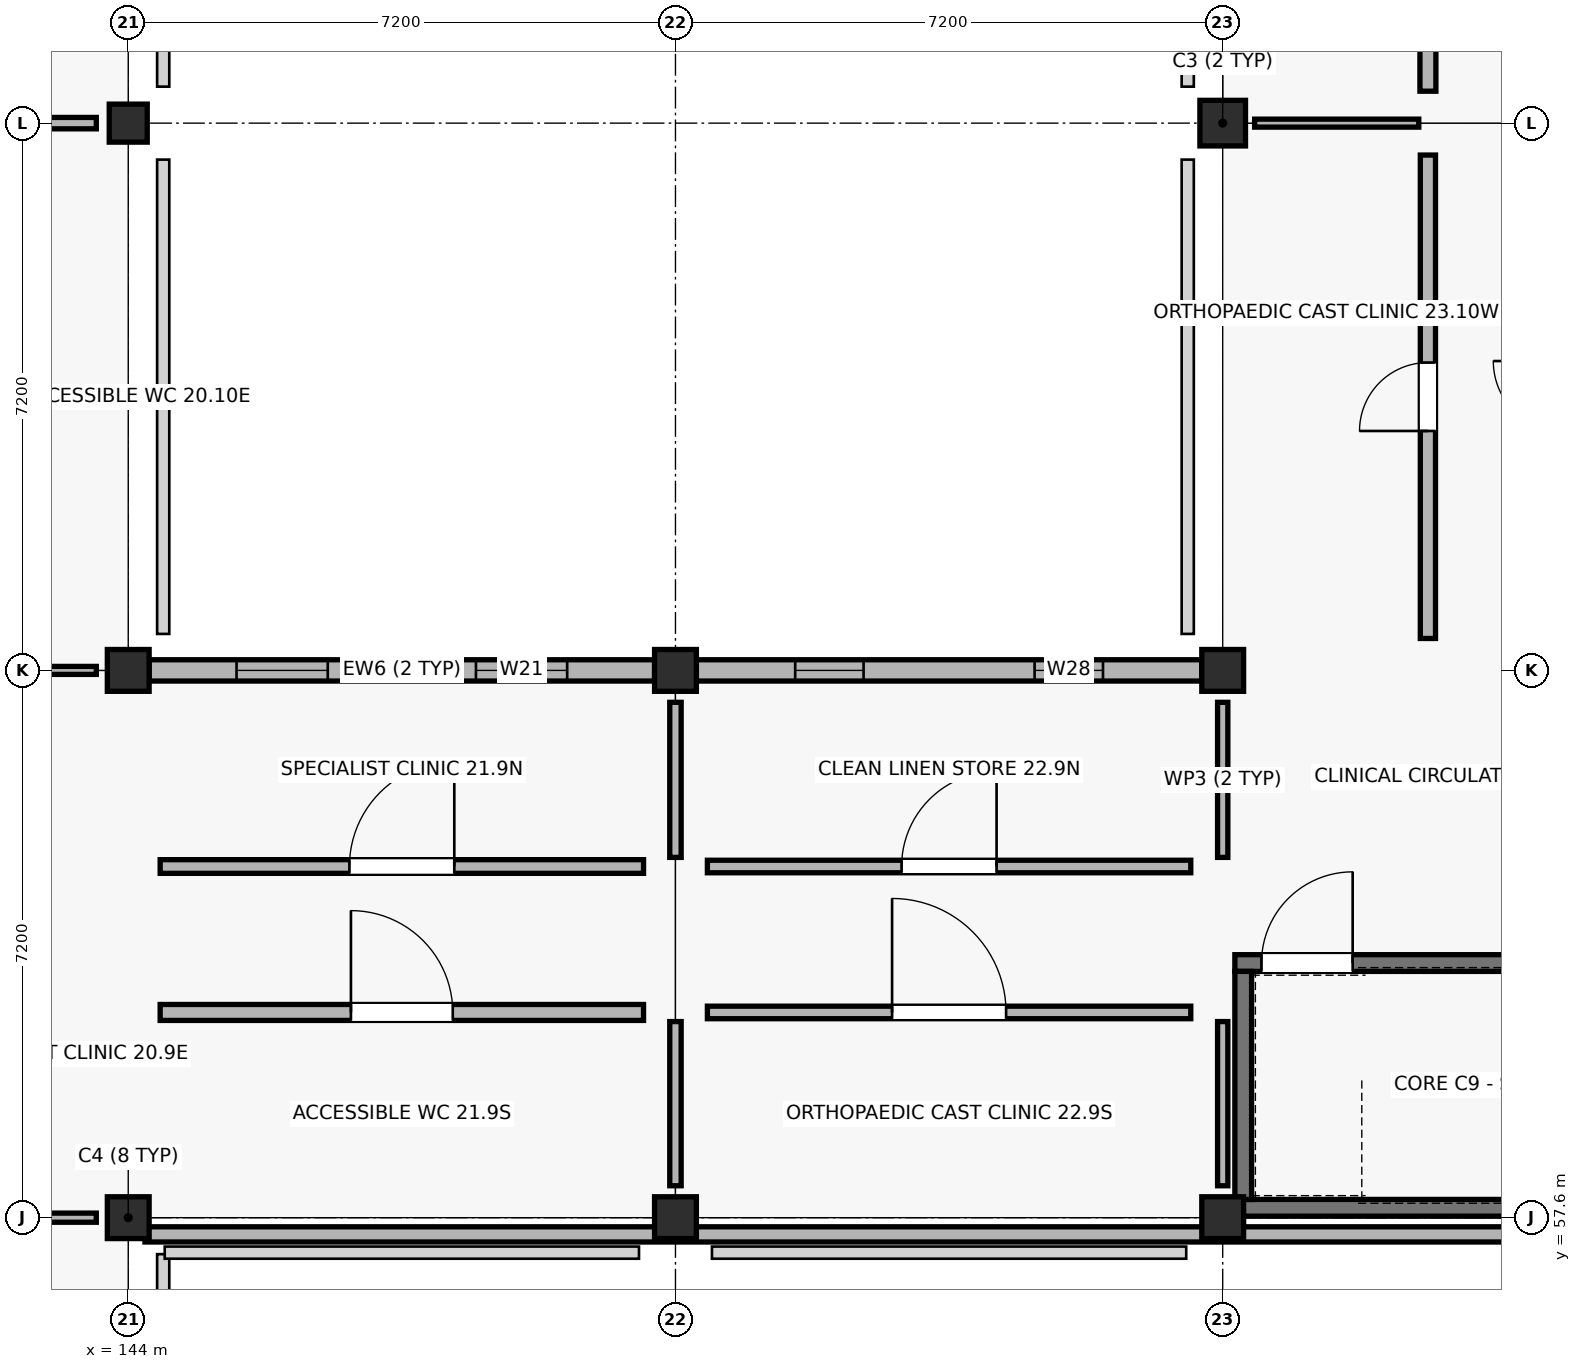
"""IFC4 building model, lengths in metres.
Left out: names, types, materials, properties, quantities, classifications, styles, units other than length and angle.
Written with IfcOpenShell. Run it as: python <this file> out.ifc"""

import sys

from ifc_helpers import new_model, si_unit, direction, frame, frame_2d, origin, origin_2d, place, context, subcontext, project, spatial, rectangle, extrude, element, fill, save


model = new_model("IFC4")
c1 = context("Model", 3, precision=1e-05, world=origin(), true_north=direction((0.0, 1.0)))
c2 = subcontext(c1, "Body", "Model", "MODEL_VIEW")
j1 = project(units=[si_unit("LENGTHUNIT", "METRE"), si_unit("PLANEANGLEUNIT", "RADIAN")], contexts=[c1])
p1 = place(None, origin())
s1 = spatial("IfcSite", under=j1, at=p1, CompositionType="ELEMENT")
p2 = place(p1, origin())
s2 = spatial("IfcBuilding", under=s1, at=p2, CompositionType="ELEMENT")
p3 = place(p2, frame((0.0, 0.0, 9.0)))
s3 = spatial("IfcBuildingStorey", under=s2, at=p3, CompositionType="ELEMENT", Elevation=9.0)
for number, where, z_axis, x_axis in (
    (1, (144.0, 57.6, 0.0), (0.0, 0.0, 1.0), (1.0, 0.0, 0.0)),
    (2, (144.0, 64.8, 0.0), (0.0, 0.0, 1.0), (1.0, 0.0, 0.0)),
):
    element("IfcColumn", number, at=place(p3, frame(where, z_axis=z_axis, x_axis=x_axis)), inside=s3, PredefinedType="COLUMN", context=c2, shape_type="SweptSolid", body=[
        extrude(rectangle(XDim=0.55, YDim=0.55, at=origin_2d()), origin(), (0.0, 0.0, 1.0), 4.5),
    ])
p4 = place(p3, frame((144.0, 72.0, 0.0), z_axis=(0.0, 0.0, 1.0), x_axis=(1.0, 0.0, 0.0)))
e3 = element("IfcColumn", 3, at=p4, inside=s3, PredefinedType="COLUMN", context=c2, shape_type="SweptSolid", body=[
    extrude(rectangle(XDim=0.5, YDim=0.5, at=origin_2d()), origin(), (0.0, 0.0, 1.0), 4.28),
])
for number, where, z_axis, x_axis in (
    (4, (151.2, 57.6, 0.0), (0.0, 0.0, 1.0), (1.0, 0.0, 0.0)),
    (5, (151.2, 64.8, 0.0), (0.0, 0.0, 1.0), (1.0, 0.0, 0.0)),
    (6, (158.4, 57.6, 0.0), (0.0, 0.0, 1.0), (1.0, 0.0, 0.0)),
    (7, (158.4, 64.8, 0.0), (0.0, 0.0, 1.0), (1.0, 0.0, 0.0)),
):
    element("IfcColumn", number, at=place(p3, frame(where, z_axis=z_axis, x_axis=x_axis)), inside=s3, PredefinedType="COLUMN", context=c2, shape_type="SweptSolid", body=[
        extrude(rectangle(XDim=0.55, YDim=0.55, at=origin_2d()), origin(), (0.0, 0.0, 1.0), 4.5),
    ])
p5 = place(p3, frame((158.4, 72.0, 0.0), z_axis=(0.0, 0.0, 1.0), x_axis=(1.0, 0.0, 0.0)))
e8 = element("IfcColumn", 8, at=p5, inside=s3, PredefinedType="COLUMN", context=c2, shape_type="SweptSolid", body=[
    extrude(rectangle(XDim=0.6, YDim=0.6, at=origin_2d()), origin(), (0.0, 0.0, 1.0), 4.5),
])
p6 = place(p3, frame((150.925, 64.8, 0.0), z_axis=(0.0, 0.0, 1.0), x_axis=(-1.0, 0.0, 0.0)))
e9 = element("IfcWall", 9, at=p6, inside=s3, PredefinedType="STANDARD", context=c2, shape_type="SweptSolid", body=[
    extrude(rectangle(XDim=6.65, YDim=0.28, at=frame_2d((3.325, 0.0))), origin(), (0.0, 0.0, 1.0), 3.59),
])
p7 = place(p6, frame((1.15, 0.0, 0.9)))
e10 = element("IfcOpeningElement", 10, at=p7, cuts=e9, PredefinedType="OPENING", context=c2, shape_type="SweptSolid", body=[
    extrude(rectangle(XDim=1.2, YDim=1.5, at=frame_2d((0.6, 0.75))), frame((0.0, 0.15, 0.0), z_axis=(0.0, -1.0, 0.0), x_axis=(1.0, 0.0, 0.0)), (0.0, 0.0, 1.0), 0.3),
])
p8 = place(p6, frame((4.3, 0.0, 0.9)))
e11 = element("IfcOpeningElement", 11, at=p8, cuts=e9, PredefinedType="OPENING", context=c2, shape_type="SweptSolid", body=[
    extrude(rectangle(XDim=1.2, YDim=1.5, at=frame_2d((0.6, 0.75))), frame((0.0, 0.15, 0.0), z_axis=(0.0, -1.0, 0.0), x_axis=(1.0, 0.0, 0.0)), (0.0, 0.0, 1.0), 0.3),
])
p9 = place(p3, frame((158.125, 64.8, 0.0), z_axis=(0.0, 0.0, 1.0), x_axis=(-1.0, 0.0, 0.0)))
e12 = element("IfcWall", 12, at=p9, inside=s3, PredefinedType="STANDARD", context=c2, shape_type="SweptSolid", body=[
    extrude(rectangle(XDim=6.65, YDim=0.28, at=frame_2d((3.325, 0.0))), origin(), (0.0, 0.0, 1.0), 3.59),
])
p10 = place(p9, frame((1.3, 0.0, 0.9)))
e13 = element("IfcOpeningElement", 13, at=p10, cuts=e12, PredefinedType="OPENING", context=c2, shape_type="SweptSolid", body=[
    extrude(rectangle(XDim=0.9, YDim=1.62, at=frame_2d((0.45, 0.81))), frame((0.0, 0.15, 0.0), z_axis=(0.0, -1.0, 0.0), x_axis=(1.0, 0.0, 0.0)), (0.0, 0.0, 1.0), 0.3),
])
p11 = place(p9, frame((4.45, 0.0, 0.9)))
e14 = element("IfcOpeningElement", 14, at=p11, cuts=e12, PredefinedType="OPENING", context=c2, shape_type="SweptSolid", body=[
    extrude(rectangle(XDim=0.9, YDim=1.62, at=frame_2d((0.45, 0.81))), frame((0.0, 0.15, 0.0), z_axis=(0.0, -1.0, 0.0), x_axis=(1.0, 0.0, 0.0)), (0.0, 0.0, 1.0), 0.3),
])
p12 = place(p3, frame((144.22, 57.38, 0.0), z_axis=(0.0, 0.0, 1.0), x_axis=(1.0, 0.0, 0.0)))
e15 = element("IfcWall", 15, at=p12, inside=s3, PredefinedType="PARAPET", context=c2, shape_type="SweptSolid", body=[
    extrude(rectangle(XDim=21.38, YDim=0.2, at=frame_2d((10.69, 0.0))), origin(), (0.0, 0.0, 1.0), 0.95),
])
p13 = place(p3, frame((158.56, 57.73, 0.0), z_axis=(0.0, 0.0, 1.0), x_axis=(1.0, 0.0, 0.0)))
e16 = element("IfcWall", 16, at=p13, inside=s3, PredefinedType="SHEAR", context=c2, shape_type="SweptSolid", body=[
    extrude(rectangle(XDim=6.88, YDim=0.22, at=frame_2d((3.44, 0.0))), origin(), (0.0, 0.0, 1.0), 4.24),
])
p14 = place(p3, frame((158.56, 60.95, 0.0), z_axis=(0.0, 0.0, 1.0), x_axis=(1.0, 0.0, 0.0)))
e17 = element("IfcWall", 17, at=p14, inside=s3, PredefinedType="SHEAR", context=c2, shape_type="SweptSolid", body=[
    extrude(rectangle(XDim=6.88, YDim=0.22, at=frame_2d((3.44, 0.0))), origin(), (0.0, 0.0, 1.0), 4.24),
])
p15 = place(p14, frame((0.35, 0.0, 0.0)))
e18 = element("IfcOpeningElement", 18, at=p15, cuts=e17, PredefinedType="OPENING", context=c2, shape_type="SweptSolid", body=[
    extrude(rectangle(XDim=1.2, YDim=2.15, at=frame_2d((0.6, 1.075))), frame((0.0, 0.12, 0.0), z_axis=(0.0, -1.0, 0.0), x_axis=(1.0, 0.0, 0.0)), (0.0, 0.0, 1.0), 0.24),
])
p16 = place(p3, frame((158.67, 57.84, 0.0), z_axis=(0.0, 0.0, 1.0), x_axis=(0.0, 1.0, 0.0)))
e19 = element("IfcWall", 19, at=p16, inside=s3, PredefinedType="SHEAR", context=c2, shape_type="SweptSolid", body=[
    extrude(rectangle(XDim=3.0, YDim=0.22, at=frame_2d((1.5, 0.0))), origin(), (0.0, 0.0, 1.0), 4.24),
])
p17 = place(p3, frame((141.42, 57.6, 0.0), z_axis=(0.0, 0.0, 1.0), x_axis=(1.0, 0.0, 0.0)))
e20 = element("IfcWall", 20, at=p17, inside=s3, PredefinedType="PARTITIONING", context=c2, shape_type="SweptSolid", body=[
    extrude(rectangle(XDim=2.16, YDim=0.12, at=frame_2d((1.08, 0.0))), origin(), (0.0, 0.0, 1.0), 3.38),
])
p18 = place(p3, frame((141.42, 64.8, 0.0), z_axis=(0.0, 0.0, 1.0), x_axis=(1.0, 0.0, 0.0)))
e21 = element("IfcWall", 21, at=p18, inside=s3, PredefinedType="PARTITIONING", context=c2, shape_type="SweptSolid", body=[
    extrude(rectangle(XDim=2.16, YDim=0.105, at=frame_2d((1.08, 0.0))), origin(), (0.0, 0.0, 1.0), 3.38),
])
p19 = place(p3, frame((141.42, 72.0, 0.0), z_axis=(0.0, 0.0, 1.0), x_axis=(1.0, 0.0, 0.0)))
e22 = element("IfcWall", 22, at=p19, inside=s3, PredefinedType="PARTITIONING", context=c2, shape_type="SweptSolid", body=[
    extrude(rectangle(XDim=2.16, YDim=0.15, at=frame_2d((1.08, 0.0))), origin(), (0.0, 0.0, 1.0), 3.38),
])
p20 = place(p3, frame((144.42, 60.3, 0.0), z_axis=(0.0, 0.0, 1.0), x_axis=(1.0, 0.0, 0.0)))
e23 = element("IfcWall", 23, at=p20, inside=s3, PredefinedType="PLUMBINGWALL", context=c2, shape_type="SweptSolid", body=[
    extrude(rectangle(XDim=6.36, YDim=0.21, at=frame_2d((3.18, 0.0))), origin(), (0.0, 0.0, 1.0), 3.38),
])
p21 = place(p20, frame((2.51, 0.0, 0.0)))
e24 = element("IfcOpeningElement", 24, at=p21, cuts=e23, PredefinedType="OPENING", context=c2, shape_type="SweptSolid", body=[
    extrude(rectangle(XDim=1.34, YDim=2.19, at=frame_2d((0.67, 1.095))), frame((0.0, 0.115, 0.0), z_axis=(0.0, -1.0, 0.0), x_axis=(1.0, 0.0, 0.0)), (0.0, 0.0, 1.0), 0.23),
])
p22 = place(p3, frame((151.2, 58.02, 0.0), z_axis=(0.0, 0.0, 1.0), x_axis=(0.0, 1.0, 0.0)))
e25 = element("IfcWall", 25, at=p22, inside=s3, PredefinedType="PARTITIONING", context=c2, shape_type="SweptSolid", body=[
    extrude(rectangle(XDim=2.16, YDim=0.15, at=frame_2d((1.08, 0.0))), origin(), (0.0, 0.0, 1.0), 3.38),
])
p23 = place(p3, frame((144.42, 62.22, 0.0), z_axis=(0.0, 0.0, 1.0), x_axis=(1.0, 0.0, 0.0)))
e26 = element("IfcWall", 26, at=p23, inside=s3, PredefinedType="PARTITIONING", context=c2, shape_type="SweptSolid", body=[
    extrude(rectangle(XDim=6.36, YDim=0.18, at=frame_2d((3.18, 0.0))), origin(), (0.0, 0.0, 1.0), 3.38),
])
p24 = place(p23, frame((2.49, 0.0, 0.0)))
e27 = element("IfcOpeningElement", 27, at=p24, cuts=e26, PredefinedType="OPENING", context=c2, shape_type="SweptSolid", body=[
    extrude(rectangle(XDim=1.38, YDim=2.19, at=frame_2d((0.69, 1.095))), frame((0.0, 0.1, 0.0), z_axis=(0.0, -1.0, 0.0), x_axis=(1.0, 0.0, 0.0)), (0.0, 0.0, 1.0), 0.2),
])
p25 = place(p3, frame((151.2, 62.34, 0.0), z_axis=(0.0, 0.0, 1.0), x_axis=(0.0, 1.0, 0.0)))
e28 = element("IfcWall", 28, at=p25, inside=s3, PredefinedType="PARTITIONING", context=c2, shape_type="SweptSolid", body=[
    extrude(rectangle(XDim=2.04, YDim=0.15, at=frame_2d((1.02, 0.0))), origin(), (0.0, 0.0, 1.0), 3.38),
])
p26 = place(p3, frame((151.62, 60.3, 0.0), z_axis=(0.0, 0.0, 1.0), x_axis=(1.0, 0.0, 0.0)))
e29 = element("IfcWall", 29, at=p26, inside=s3, PredefinedType="PARTITIONING", context=c2, shape_type="SweptSolid", body=[
    extrude(rectangle(XDim=6.36, YDim=0.165, at=frame_2d((3.18, 0.0))), origin(), (0.0, 0.0, 1.0), 3.38),
])
p27 = place(p26, frame((2.43, 0.0, 0.0)))
e30 = element("IfcOpeningElement", 30, at=p27, cuts=e29, PredefinedType="OPENING", context=c2, shape_type="SweptSolid", body=[
    extrude(rectangle(XDim=1.5, YDim=2.19, at=frame_2d((0.75, 1.095))), frame((0.0, 0.093, 0.0), z_axis=(0.0, -1.0, 0.0), x_axis=(1.0, 0.0, 0.0)), (0.0, 0.0, 1.0), 0.185),
])
p28 = place(p3, frame((158.4, 58.02, 0.0), z_axis=(0.0, 0.0, 1.0), x_axis=(0.0, 1.0, 0.0)))
e31 = element("IfcWall", 31, at=p28, inside=s3, PredefinedType="PARTITIONING", context=c2, shape_type="SweptSolid", body=[
    extrude(rectangle(XDim=2.16, YDim=0.135, at=frame_2d((1.08, 0.0))), origin(), (0.0, 0.0, 1.0), 3.38),
])
p29 = place(p3, frame((151.62, 62.22, 0.0), z_axis=(0.0, 0.0, 1.0), x_axis=(1.0, 0.0, 0.0)))
e32 = element("IfcWall", 32, at=p29, inside=s3, PredefinedType="PARTITIONING", context=c2, shape_type="SweptSolid", body=[
    extrude(rectangle(XDim=6.36, YDim=0.165, at=frame_2d((3.18, 0.0))), origin(), (0.0, 0.0, 1.0), 3.38),
])
p30 = place(p29, frame((2.555, 0.0, 0.0)))
e33 = element("IfcOpeningElement", 33, at=p30, cuts=e32, PredefinedType="OPENING", context=c2, shape_type="SweptSolid", body=[
    extrude(rectangle(XDim=1.25, YDim=2.15, at=frame_2d((0.625, 1.075))), frame((0.0, 0.093, 0.0), z_axis=(0.0, -1.0, 0.0), x_axis=(1.0, 0.0, 0.0)), (0.0, 0.0, 1.0), 0.185),
])
p31 = place(p3, frame((158.4, 62.34, 0.0), z_axis=(0.0, 0.0, 1.0), x_axis=(0.0, 1.0, 0.0)))
e34 = element("IfcWall", 34, at=p31, inside=s3, PredefinedType="PARTITIONING", context=c2, shape_type="SweptSolid", body=[
    extrude(rectangle(XDim=2.04, YDim=0.135, at=frame_2d((1.02, 0.0))), origin(), (0.0, 0.0, 1.0), 3.38),
])
p32 = place(p3, frame((161.1, 65.22, 0.0), z_axis=(0.0, 0.0, 1.0), x_axis=(0.0, 1.0, 0.0)))
e35 = element("IfcWall", 35, at=p32, inside=s3, PredefinedType="SOLIDWALL", context=c2, shape_type="SweptSolid", body=[
    extrude(rectangle(XDim=6.36, YDim=0.2, at=frame_2d((3.18, 0.0))), origin(), (0.0, 0.0, 1.0), 3.38),
])
p33 = place(p32, frame((2.73, 0.0, 0.0)))
e36 = element("IfcOpeningElement", 36, at=p33, cuts=e35, PredefinedType="OPENING", context=c2, shape_type="SweptSolid", body=[
    extrude(rectangle(XDim=0.9, YDim=2.04, at=frame_2d((0.45, 1.02))), frame((0.0, 0.11, 0.0), z_axis=(0.0, -1.0, 0.0), x_axis=(1.0, 0.0, 0.0)), (0.0, 0.0, 1.0), 0.22),
])
p34 = place(p3, frame((158.82, 72.0, 0.0), z_axis=(0.0, 0.0, 1.0), x_axis=(1.0, 0.0, 0.0)))
e37 = element("IfcWall", 37, at=p34, inside=s3, PredefinedType="PARTITIONING", context=c2, shape_type="SweptSolid", body=[
    extrude(rectangle(XDim=2.16, YDim=0.105, at=frame_2d((1.08, 0.0))), origin(), (0.0, 0.0, 1.0), 3.38),
])
p35 = place(p3, frame((161.1, 72.42, 0.0), z_axis=(0.0, 0.0, 1.0), x_axis=(0.0, 1.0, 0.0)))
e38 = element("IfcWall", 38, at=p35, inside=s3, PredefinedType="PLUMBINGWALL", context=c2, shape_type="SweptSolid", body=[
    extrude(rectangle(XDim=6.36, YDim=0.21, at=frame_2d((3.18, 0.0))), origin(), (0.0, 0.0, 1.0), 3.38),
])
p36 = place(p35, frame((2.69, 0.0, 0.0)))
e39 = element("IfcOpeningElement", 39, at=p36, cuts=e38, PredefinedType="OPENING", context=c2, shape_type="SweptSolid", body=[
    extrude(rectangle(XDim=0.98, YDim=2.04, at=frame_2d((0.49, 1.02))), frame((0.0, 0.115, 0.0), z_axis=(0.0, -1.0, 0.0), x_axis=(1.0, 0.0, 0.0)), (0.0, 0.0, 1.0), 0.23),
])
p37 = place(p7, origin())
e40 = element("IfcWindow", 40, at=p37, inside=s3, PartitioningType="SINGLE_PANEL", PredefinedType="WINDOW", context=c2, shape_type="SweptSolid", body=[
    extrude(rectangle(XDim=1.2, YDim=1.5, at=frame_2d((0.6, 0.75))), frame((0.0, 0.03, 0.0), z_axis=(0.0, -1.0, 0.0), x_axis=(1.0, 0.0, 0.0)), (0.0, 0.0, 1.0), 0.06),
])
fill(e10, e40)
p38 = place(p8, origin())
e41 = element("IfcWindow", 41, at=p38, inside=s3, PartitioningType="SINGLE_PANEL", PredefinedType="WINDOW", context=c2, shape_type="SweptSolid", body=[
    extrude(rectangle(XDim=1.2, YDim=1.5, at=frame_2d((0.6, 0.75))), frame((0.0, 0.03, 0.0), z_axis=(0.0, -1.0, 0.0), x_axis=(1.0, 0.0, 0.0)), (0.0, 0.0, 1.0), 0.06),
])
fill(e11, e41)
p39 = place(p10, origin())
e42 = element("IfcWindow", 42, at=p39, inside=s3, PartitioningType="SINGLE_PANEL", PredefinedType="WINDOW", context=c2, shape_type="SweptSolid", body=[
    extrude(rectangle(XDim=0.9, YDim=1.62, at=frame_2d((0.45, 0.81))), frame((0.0, 0.03, 0.0), z_axis=(0.0, -1.0, 0.0), x_axis=(1.0, 0.0, 0.0)), (0.0, 0.0, 1.0), 0.06),
])
fill(e13, e42)
p40 = place(p11, origin())
e43 = element("IfcWindow", 43, at=p40, inside=s3, PartitioningType="SINGLE_PANEL", PredefinedType="WINDOW", context=c2, shape_type="SweptSolid", body=[
    extrude(rectangle(XDim=0.9, YDim=1.62, at=frame_2d((0.45, 0.81))), frame((0.0, 0.03, 0.0), z_axis=(0.0, -1.0, 0.0), x_axis=(1.0, 0.0, 0.0)), (0.0, 0.0, 1.0), 0.06),
])
fill(e14, e43)
p41 = place(p15, origin())
e44 = element("IfcDoor", 44, at=p41, inside=s3, OperationType="SINGLE_SWING_RIGHT", PredefinedType="DOOR", context=c2, shape_type="SweptSolid", body=[
    extrude(rectangle(XDim=1.2, YDim=2.15, at=frame_2d((0.6, 1.075))), frame((0.0, 0.025, 0.0), z_axis=(0.0, -1.0, 0.0), x_axis=(1.0, 0.0, 0.0)), (0.0, 0.0, 1.0), 0.05),
])
fill(e18, e44)
p42 = place(p21, origin())
e45 = element("IfcDoor", 45, at=p42, inside=s3, OperationType="SINGLE_SWING_LEFT", PredefinedType="DOOR", context=c2, shape_type="SweptSolid", body=[
    extrude(rectangle(XDim=1.34, YDim=2.19, at=frame_2d((0.67, 1.095))), frame((0.0, 0.025, 0.0), z_axis=(0.0, -1.0, 0.0), x_axis=(1.0, 0.0, 0.0)), (0.0, 0.0, 1.0), 0.05),
])
fill(e24, e45)
p43 = place(p24, origin())
e46 = element("IfcDoor", 46, at=p43, inside=s3, OperationType="SINGLE_SWING_RIGHT", PredefinedType="DOOR", context=c2, shape_type="SweptSolid", body=[
    extrude(rectangle(XDim=1.38, YDim=2.19, at=frame_2d((0.69, 1.095))), frame((0.0, 0.025, 0.0), z_axis=(0.0, -1.0, 0.0), x_axis=(1.0, 0.0, 0.0)), (0.0, 0.0, 1.0), 0.05),
])
fill(e27, e46)
p44 = place(p27, origin())
e47 = element("IfcDoor", 47, at=p44, inside=s3, OperationType="SINGLE_SWING_LEFT", PredefinedType="DOOR", context=c2, shape_type="SweptSolid", body=[
    extrude(rectangle(XDim=1.5, YDim=2.19, at=frame_2d((0.75, 1.095))), frame((0.0, 0.025, 0.0), z_axis=(0.0, -1.0, 0.0), x_axis=(1.0, 0.0, 0.0)), (0.0, 0.0, 1.0), 0.05),
])
fill(e30, e47)
p45 = place(p30, origin())
e48 = element("IfcDoor", 48, at=p45, inside=s3, OperationType="SINGLE_SWING_RIGHT", PredefinedType="DOOR", context=c2, shape_type="SweptSolid", body=[
    extrude(rectangle(XDim=1.25, YDim=2.15, at=frame_2d((0.625, 1.075))), frame((0.0, 0.025, 0.0), z_axis=(0.0, -1.0, 0.0), x_axis=(1.0, 0.0, 0.0)), (0.0, 0.0, 1.0), 0.05),
])
fill(e33, e48)
p46 = place(p33, origin())
e49 = element("IfcDoor", 49, at=p46, inside=s3, OperationType="SINGLE_SWING_LEFT", PredefinedType="DOOR", context=c2, shape_type="SweptSolid", body=[
    extrude(rectangle(XDim=0.9, YDim=2.04, at=frame_2d((0.45, 1.02))), frame((0.0, 0.025, 0.0), z_axis=(0.0, -1.0, 0.0), x_axis=(1.0, 0.0, 0.0)), (0.0, 0.0, 1.0), 0.05),
])
fill(e36, e49)
save(model, sys.argv[1])
